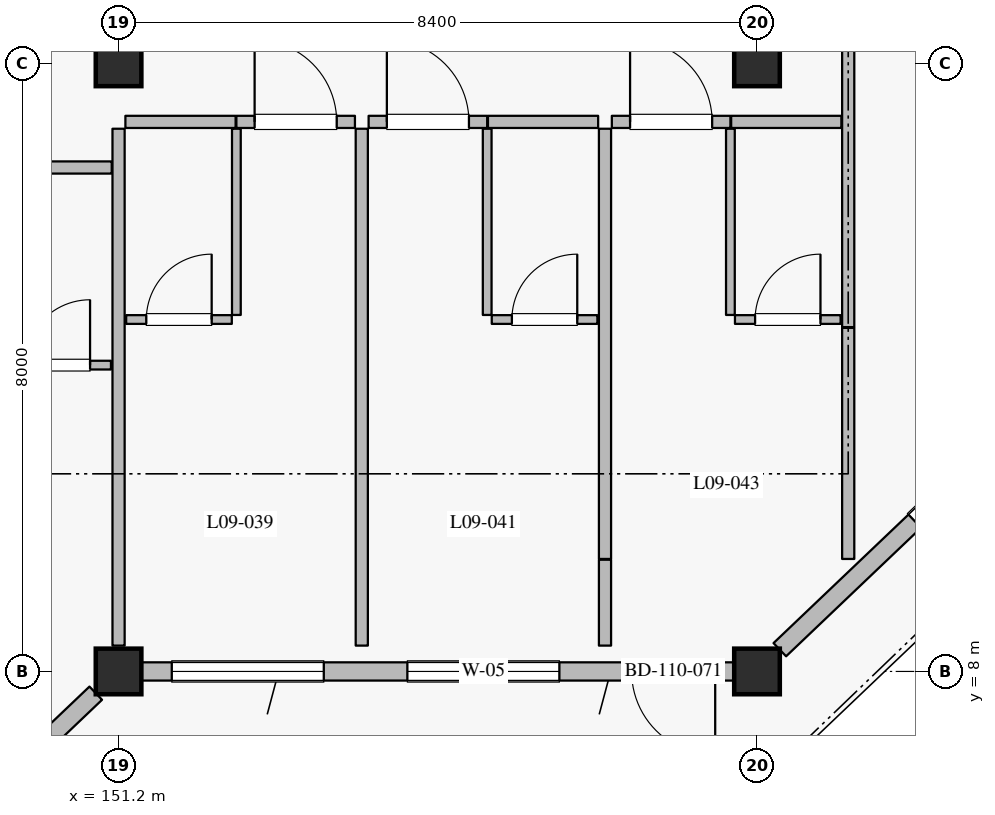
"""IFC4 building model, lengths in metres.
Left out: names, types, materials, properties, quantities, classifications, styles, units other than length and angle.
Written with IfcOpenShell. Run it as: python <this file> out.ifc"""

import sys

from ifc_helpers import new_model, si_unit, direction, frame, frame_2d, origin, origin_2d, place, context, subcontext, project, spatial, rectangle, extrude, element, fill, save


model = new_model("IFC4")
c1 = context("Model", 3, precision=1e-05, world=origin(), true_north=direction((0.0, 1.0)))
c2 = subcontext(c1, "Body", "Model", "MODEL_VIEW")
j1 = project(units=[si_unit("LENGTHUNIT", "METRE"), si_unit("PLANEANGLEUNIT", "RADIAN")], contexts=[c1])
p1 = place(None, origin())
s1 = spatial("IfcSite", under=j1, at=p1, CompositionType="ELEMENT")
p2 = place(p1, origin())
s2 = spatial("IfcBuilding", under=s1, at=p2, CompositionType="ELEMENT")
p3 = place(p2, frame((0.0, 0.0, 39.6)))
s3 = spatial("IfcBuildingStorey", under=s2, at=p3, CompositionType="ELEMENT", Elevation=39.6)
for number, where, z_axis, x_axis in (
    (1, (151.2, 8.0, 0.0), (0.0, 0.0, 1.0), (1.0, 0.0, 0.0)),
    (2, (159.6, 8.0, 0.0), (0.0, 0.0, 1.0), (1.0, 0.0, 0.0)),
    (3, (151.2, 16.0, 0.0), (0.0, 0.0, 1.0), (1.0, 0.0, 0.0)),
    (4, (159.6, 16.0, 0.0), (0.0, 0.0, 1.0), (1.0, 0.0, 0.0)),
):
    element("IfcColumn", number, at=place(p3, frame(where, z_axis=z_axis, x_axis=x_axis)), inside=s3, PredefinedType="COLUMN", context=c2, shape_type="SweptSolid", body=[
        extrude(rectangle(XDim=0.6, YDim=0.6, at=origin_2d()), origin(), (0.0, 0.0, 1.0), 3.6),
    ])
p4 = place(p3, frame((150.9, 7.714, 0.0), z_axis=(0.0, 0.0, 1.0), x_axis=(-0.724145477467, -0.689647248573, 0.0)))
e5 = element("IfcWall", 5, at=p4, inside=s3, PredefinedType="SOLIDWALL", context=c2, shape_type="SweptSolid", body=[
    extrude(rectangle(XDim=10.771, YDim=0.24, at=frame_2d((5.385, 0.0))), origin(), (0.0, 0.0, 1.0), 2.94),
])
p5 = place(p4, frame((1.238, 0.0, 0.0)))
e6 = element("IfcOpeningElement", 6, at=p5, cuts=e5, PredefinedType="OPENING", context=c2, shape_type="SweptSolid", body=[
    extrude(rectangle(XDim=1.5, YDim=2.25, at=frame_2d((0.75, 1.125))), frame((0.0, 0.13, 0.0), z_axis=(0.0, -1.0, 0.0), x_axis=(1.0, 0.0, 0.0)), (0.0, 0.0, 1.0), 0.26),
])
p6 = place(p4, frame((5.58, 0.0, 0.8)))
e7 = element("IfcOpeningElement", 7, at=p6, cuts=e5, PredefinedType="OPENING", context=c2, shape_type="SweptSolid", body=[
    extrude(rectangle(XDim=1.6, YDim=1.6, at=frame_2d((0.8, 0.8))), frame((0.0, 0.13, 0.0), z_axis=(0.0, -1.0, 0.0), x_axis=(1.0, 0.0, 0.0)), (0.0, 0.0, 1.0), 0.26),
])
p7 = place(p4, frame((8.977, 0.0, 0.8)))
e8 = element("IfcOpeningElement", 8, at=p7, cuts=e5, PredefinedType="OPENING", context=c2, shape_type="SweptSolid", body=[
    extrude(rectangle(XDim=1.6, YDim=1.6, at=frame_2d((0.8, 0.8))), frame((0.0, 0.13, 0.0), z_axis=(0.0, -1.0, 0.0), x_axis=(1.0, 0.0, 0.0)), (0.0, 0.0, 1.0), 0.26),
])
p8 = place(p3, frame((159.3, 8.0, 0.0), z_axis=(0.0, 0.0, 1.0), x_axis=(-1.0, 0.0, 0.0)))
e9 = element("IfcWall", 9, at=p8, inside=s3, PredefinedType="SOLIDWALL", context=c2, shape_type="SweptSolid", body=[
    extrude(rectangle(XDim=7.8, YDim=0.24, at=frame_2d((3.9, 0.0))), origin(), (0.0, 0.0, 1.0), 2.94),
])
p9 = place(p8, frame((0.25, 0.0, 0.0)))
e10 = element("IfcOpeningElement", 10, at=p9, cuts=e9, PredefinedType="OPENING", context=c2, shape_type="SweptSolid", body=[
    extrude(rectangle(XDim=1.1, YDim=2.2, at=frame_2d((0.55, 1.1))), frame((0.0, 0.13, 0.0), z_axis=(0.0, -1.0, 0.0), x_axis=(1.0, 0.0, 0.0)), (0.0, 0.0, 1.0), 0.26),
])
p10 = place(p8, frame((2.3, 0.0, 0.8)))
e11 = element("IfcOpeningElement", 11, at=p10, cuts=e9, PredefinedType="OPENING", context=c2, shape_type="SweptSolid", body=[
    extrude(rectangle(XDim=2.0, YDim=1.75, at=frame_2d((1.0, 0.875))), frame((0.0, 0.13, 0.0), z_axis=(0.0, -1.0, 0.0), x_axis=(1.0, 0.0, 0.0)), (0.0, 0.0, 1.0), 0.26),
])
p11 = place(p8, frame((5.4, 0.0, 0.8)))
e12 = element("IfcOpeningElement", 12, at=p11, cuts=e9, PredefinedType="OPENING", context=c2, shape_type="SweptSolid", body=[
    extrude(rectangle(XDim=2.0, YDim=1.75, at=frame_2d((1.0, 0.875))), frame((0.0, 0.13, 0.0), z_axis=(0.0, -1.0, 0.0), x_axis=(1.0, 0.0, 0.0)), (0.0, 0.0, 1.0), 0.26),
])
p12 = place(p3, frame((167.7, 15.714, 0.0), z_axis=(0.0, 0.0, 1.0), x_axis=(-0.724156257633, -0.689635928973, 0.0)))
e13 = element("IfcWall", 13, at=p12, inside=s3, PredefinedType="SOLIDWALL", context=c2, shape_type="SweptSolid", body=[
    extrude(rectangle(XDim=10.771, YDim=0.24, at=frame_2d((5.386, 0.0))), origin(), (0.0, 0.0, 1.0), 2.94),
])
p13 = place(p12, frame((2.15, 0.0, 0.0)))
e14 = element("IfcOpeningElement", 14, at=p13, cuts=e13, PredefinedType="OPENING", context=c2, shape_type="SweptSolid", body=[
    extrude(rectangle(XDim=1.5, YDim=2.25, at=frame_2d((0.75, 1.125))), frame((0.0, 0.13, 0.0), z_axis=(0.0, -1.0, 0.0), x_axis=(1.0, 0.0, 0.0)), (0.0, 0.0, 1.0), 0.26),
])
p14 = place(p12, frame((6.319, 0.0, 0.8)))
e15 = element("IfcOpeningElement", 15, at=p14, cuts=e13, PredefinedType="OPENING", context=c2, shape_type="SweptSolid", body=[
    extrude(rectangle(XDim=2.0, YDim=1.75, at=frame_2d((1.0, 0.875))), frame((0.0, 0.13, 0.0), z_axis=(0.0, -1.0, 0.0), x_axis=(1.0, 0.0, 0.0)), (0.0, 0.0, 1.0), 0.26),
])
p15 = place(p3, frame((149.64, 14.63, 0.0), z_axis=(0.0, 0.0, 1.0), x_axis=(1.0, 0.0, 0.0)))
e16 = element("IfcWall", 16, at=p15, inside=s3, PredefinedType="PARTITIONING", context=c2, shape_type="SweptSolid", body=[
    extrude(rectangle(XDim=1.47, YDim=0.16, at=frame_2d((0.735, 0.0))), origin(), (0.0, 0.0, 1.0), 3.335),
])
p16 = place(p3, frame((149.69, 12.03, 0.0), z_axis=(0.0, 0.0, 1.0), x_axis=(1.0, 0.0, 0.0)))
e17 = element("IfcWall", 17, at=p16, inside=s3, PredefinedType="PARTITIONING", context=c2, shape_type="SweptSolid", body=[
    extrude(rectangle(XDim=1.41, YDim=0.115, at=frame_2d((0.705, 0.0))), origin(), (0.0, 0.0, 1.0), 3.335),
])
p17 = place(p16, frame((0.275, 0.0, 0.0)))
e18 = element("IfcOpeningElement", 18, at=p17, cuts=e17, PredefinedType="OPENING", context=c2, shape_type="SweptSolid", body=[
    extrude(rectangle(XDim=0.86, YDim=2.12, at=frame_2d((0.43, 1.06))), frame((0.0, 0.067, 0.0), z_axis=(0.0, -1.0, 0.0), x_axis=(1.0, 0.0, 0.0)), (0.0, 0.0, 1.0), 0.135),
])
p18 = place(p3, frame((151.29, 15.23, 0.0), z_axis=(0.0, 0.0, 1.0), x_axis=(1.0, 0.0, 0.0)))
e19 = element("IfcWall", 19, at=p18, inside=s3, PredefinedType="PARTITIONING", context=c2, shape_type="SweptSolid", body=[
    extrude(rectangle(XDim=1.45, YDim=0.16, at=frame_2d((0.725, 0.0))), origin(), (0.0, 0.0, 1.0), 3.335),
])
p19 = place(p3, frame((152.75, 15.23, 0.0), z_axis=(0.0, 0.0, 1.0), x_axis=(1.0, 0.0, 0.0)))
e20 = element("IfcWall", 20, at=p19, inside=s3, PredefinedType="PARTITIONING", context=c2, shape_type="SweptSolid", body=[
    extrude(rectangle(XDim=1.56, YDim=0.16, at=frame_2d((0.78, 0.0))), origin(), (0.0, 0.0, 1.0), 3.335),
])
p20 = place(p19, frame((0.24, 0.0, 0.0)))
e21 = element("IfcOpeningElement", 21, at=p20, cuts=e20, PredefinedType="OPENING", context=c2, shape_type="SweptSolid", body=[
    extrude(rectangle(XDim=1.08, YDim=2.3, at=frame_2d((0.54, 1.15))), frame((0.0, 0.09, 0.0), z_axis=(0.0, -1.0, 0.0), x_axis=(1.0, 0.0, 0.0)), (0.0, 0.0, 1.0), 0.18),
])
p21 = place(p3, frame((152.75, 12.69, 0.0), z_axis=(0.0, 0.0, 1.0), x_axis=(0.0, 1.0, 0.0)))
e22 = element("IfcWall", 22, at=p21, inside=s3, PredefinedType="PARTITIONING", context=c2, shape_type="SweptSolid", body=[
    extrude(rectangle(XDim=2.45, YDim=0.115, at=frame_2d((1.225, 0.0))), origin(), (0.0, 0.0, 1.0), 3.335),
])
p22 = place(p3, frame((151.3, 12.63, 0.0), z_axis=(0.0, 0.0, 1.0), x_axis=(1.0, 0.0, 0.0)))
e23 = element("IfcWall", 23, at=p22, inside=s3, PredefinedType="PARTITIONING", context=c2, shape_type="SweptSolid", body=[
    extrude(rectangle(XDim=1.39, YDim=0.115, at=frame_2d((0.695, 0.0))), origin(), (0.0, 0.0, 1.0), 3.335),
])
p23 = place(p22, frame((0.265, 0.0, 0.0)))
e24 = element("IfcOpeningElement", 24, at=p23, cuts=e23, PredefinedType="OPENING", context=c2, shape_type="SweptSolid", body=[
    extrude(rectangle(XDim=0.86, YDim=2.12, at=frame_2d((0.43, 1.06))), frame((0.0, 0.067, 0.0), z_axis=(0.0, -1.0, 0.0), x_axis=(1.0, 0.0, 0.0)), (0.0, 0.0, 1.0), 0.135),
])
p24 = place(p3, frame((151.2, 8.34, 0.0), z_axis=(0.0, 0.0, 1.0), x_axis=(0.0, 1.0, 0.0)))
e25 = element("IfcWall", 25, at=p24, inside=s3, PredefinedType="PARTITIONING", context=c2, shape_type="SweptSolid", body=[
    extrude(rectangle(XDim=6.8, YDim=0.16, at=frame_2d((3.4, 0.0))), origin(), (0.0, 0.0, 1.0), 2.74),
])
p25 = place(p3, frame((154.49, 15.23, 0.0), z_axis=(0.0, 0.0, 1.0), x_axis=(1.0, 0.0, 0.0)))
e26 = element("IfcWall", 26, at=p25, inside=s3, PredefinedType="PARTITIONING", context=c2, shape_type="SweptSolid", body=[
    extrude(rectangle(XDim=1.56, YDim=0.16, at=frame_2d((0.78, 0.0))), origin(), (0.0, 0.0, 1.0), 3.335),
])
p26 = place(p25, frame((0.24, 0.0, 0.0)))
e27 = element("IfcOpeningElement", 27, at=p26, cuts=e26, PredefinedType="OPENING", context=c2, shape_type="SweptSolid", body=[
    extrude(rectangle(XDim=1.08, YDim=2.3, at=frame_2d((0.54, 1.15))), frame((0.0, 0.09, 0.0), z_axis=(0.0, -1.0, 0.0), x_axis=(1.0, 0.0, 0.0)), (0.0, 0.0, 1.0), 0.18),
])
p27 = place(p3, frame((156.06, 15.23, 0.0), z_axis=(0.0, 0.0, 1.0), x_axis=(1.0, 0.0, 0.0)))
e28 = element("IfcWall", 28, at=p27, inside=s3, PredefinedType="PARTITIONING", context=c2, shape_type="SweptSolid", body=[
    extrude(rectangle(XDim=1.45, YDim=0.16, at=frame_2d((0.725, 0.0))), origin(), (0.0, 0.0, 1.0), 3.335),
])
p28 = place(p3, frame((156.05, 12.69, 0.0), z_axis=(0.0, 0.0, 1.0), x_axis=(0.0, 1.0, 0.0)))
e29 = element("IfcWall", 29, at=p28, inside=s3, PredefinedType="PARTITIONING", context=c2, shape_type="SweptSolid", body=[
    extrude(rectangle(XDim=2.45, YDim=0.115, at=frame_2d((1.225, 0.0))), origin(), (0.0, 0.0, 1.0), 3.335),
])
p29 = place(p3, frame((156.11, 12.63, 0.0), z_axis=(0.0, 0.0, 1.0), x_axis=(1.0, 0.0, 0.0)))
e30 = element("IfcWall", 30, at=p29, inside=s3, PredefinedType="PARTITIONING", context=c2, shape_type="SweptSolid", body=[
    extrude(rectangle(XDim=1.39, YDim=0.115, at=frame_2d((0.695, 0.0))), origin(), (0.0, 0.0, 1.0), 3.335),
])
p30 = place(p29, frame((0.265, 0.0, 0.0)))
e31 = element("IfcOpeningElement", 31, at=p30, cuts=e30, PredefinedType="OPENING", context=c2, shape_type="SweptSolid", body=[
    extrude(rectangle(XDim=0.86, YDim=2.12, at=frame_2d((0.43, 1.06))), frame((0.0, 0.067, 0.0), z_axis=(0.0, -1.0, 0.0), x_axis=(1.0, 0.0, 0.0)), (0.0, 0.0, 1.0), 0.135),
])
p31 = place(p3, frame((154.4, 8.34, 0.0), z_axis=(0.0, 0.0, 1.0), x_axis=(0.0, 1.0, 0.0)))
e32 = element("IfcWall", 32, at=p31, inside=s3, PredefinedType="PARTITIONING", context=c2, shape_type="SweptSolid", body=[
    extrude(rectangle(XDim=6.8, YDim=0.16, at=frame_2d((3.4, 0.0))), origin(), (0.0, 0.0, 1.0), 3.335),
])
p32 = place(p3, frame((157.6, 8.34, 0.0), z_axis=(0.0, 0.0, 1.0), x_axis=(0.0, 1.0, 0.0)))
e33 = element("IfcWall", 33, at=p32, inside=s3, PredefinedType="PARTITIONING", context=c2, shape_type="SweptSolid", body=[
    extrude(rectangle(XDim=1.13, YDim=0.16, at=frame_2d((0.565, 0.0))), origin(), (0.0, 0.0, 1.0), 3.335),
])
p33 = place(p3, frame((157.69, 15.23, 0.0), z_axis=(0.0, 0.0, 1.0), x_axis=(1.0, 0.0, 0.0)))
e34 = element("IfcWall", 34, at=p33, inside=s3, PredefinedType="PARTITIONING", context=c2, shape_type="SweptSolid", body=[
    extrude(rectangle(XDim=1.56, YDim=0.16, at=frame_2d((0.78, 0.0))), origin(), (0.0, 0.0, 1.0), 3.335),
])
p34 = place(p33, frame((0.24, 0.0, 0.0)))
e35 = element("IfcOpeningElement", 35, at=p34, cuts=e34, PredefinedType="OPENING", context=c2, shape_type="SweptSolid", body=[
    extrude(rectangle(XDim=1.08, YDim=2.3, at=frame_2d((0.54, 1.15))), frame((0.0, 0.09, 0.0), z_axis=(0.0, -1.0, 0.0), x_axis=(1.0, 0.0, 0.0)), (0.0, 0.0, 1.0), 0.18),
])
p35 = place(p3, frame((159.26, 15.23, 0.0), z_axis=(0.0, 0.0, 1.0), x_axis=(1.0, 0.0, 0.0)))
e36 = element("IfcWall", 36, at=p35, inside=s3, PredefinedType="PARTITIONING", context=c2, shape_type="SweptSolid", body=[
    extrude(rectangle(XDim=1.45, YDim=0.16, at=frame_2d((0.725, 0.0))), origin(), (0.0, 0.0, 1.0), 3.335),
])
p36 = place(p3, frame((159.25, 12.69, 0.0), z_axis=(0.0, 0.0, 1.0), x_axis=(0.0, 1.0, 0.0)))
e37 = element("IfcWall", 37, at=p36, inside=s3, PredefinedType="PARTITIONING", context=c2, shape_type="SweptSolid", body=[
    extrude(rectangle(XDim=2.45, YDim=0.115, at=frame_2d((1.225, 0.0))), origin(), (0.0, 0.0, 1.0), 3.335),
])
p37 = place(p3, frame((159.31, 12.63, 0.0), z_axis=(0.0, 0.0, 1.0), x_axis=(1.0, 0.0, 0.0)))
e38 = element("IfcWall", 38, at=p37, inside=s3, PredefinedType="PARTITIONING", context=c2, shape_type="SweptSolid", body=[
    extrude(rectangle(XDim=1.39, YDim=0.115, at=frame_2d((0.695, 0.0))), origin(), (0.0, 0.0, 1.0), 3.335),
])
p38 = place(p37, frame((0.265, 0.0, 0.0)))
e39 = element("IfcOpeningElement", 39, at=p38, cuts=e38, PredefinedType="OPENING", context=c2, shape_type="SweptSolid", body=[
    extrude(rectangle(XDim=0.86, YDim=2.12, at=frame_2d((0.43, 1.06))), frame((0.0, 0.067, 0.0), z_axis=(0.0, -1.0, 0.0), x_axis=(1.0, 0.0, 0.0)), (0.0, 0.0, 1.0), 0.135),
])
p39 = place(p3, frame((157.6, 9.48, 0.0), z_axis=(0.0, 0.0, 1.0), x_axis=(0.0, 1.0, 0.0)))
e40 = element("IfcWall", 40, at=p39, inside=s3, PredefinedType="PARTITIONING", context=c2, shape_type="SweptSolid", body=[
    extrude(rectangle(XDim=5.66, YDim=0.16, at=frame_2d((2.83, 0.0))), origin(), (0.0, 0.0, 1.0), 3.335),
])
p40 = place(p3, frame((160.8, 9.48, 0.0), z_axis=(0.0, 0.0, 1.0), x_axis=(0.0, 1.0, 0.0)))
e41 = element("IfcWall", 41, at=p40, inside=s3, PredefinedType="PARTITIONING", context=c2, shape_type="SweptSolid", body=[
    extrude(rectangle(XDim=3.04, YDim=0.16, at=frame_2d((1.52, 0.0))), origin(), (0.0, 0.0, 1.0), 3.335),
])
p41 = place(p3, frame((160.8, 12.53, 0.0), z_axis=(0.0, 0.0, 1.0), x_axis=(0.0, 1.0, 0.0)))
e42 = element("IfcWall", 42, at=p41, inside=s3, PredefinedType="PARTITIONING", context=c2, shape_type="SweptSolid", body=[
    extrude(rectangle(XDim=9.55, YDim=0.16, at=frame_2d((4.775, 0.0))), origin(), (0.0, 0.0, 1.0), 3.335),
])
p42 = place(p9, origin())
e43 = element("IfcDoor", 43, at=p42, inside=s3, OperationType="SINGLE_SWING_LEFT", PredefinedType="DOOR", context=c2, shape_type="SweptSolid", body=[
    extrude(rectangle(XDim=1.1, YDim=2.2, at=frame_2d((0.55, 1.1))), frame((0.0, 0.025, 0.0), z_axis=(0.0, -1.0, 0.0), x_axis=(1.0, 0.0, 0.0)), (0.0, 0.0, 1.0), 0.05),
])
fill(e10, e43)
p43 = place(p10, origin())
e44 = element("IfcWindow", 44, at=p43, inside=s3, PartitioningType="DOUBLE_PANEL_VERTICAL", PredefinedType="WINDOW", context=c2, shape_type="SweptSolid", body=[
    extrude(rectangle(XDim=2.0, YDim=1.75, at=frame_2d((1.0, 0.875))), frame((0.0, 0.03, 0.0), z_axis=(0.0, -1.0, 0.0), x_axis=(1.0, 0.0, 0.0)), (0.0, 0.0, 1.0), 0.06),
])
fill(e11, e44)
p44 = place(p11, origin())
e45 = element("IfcWindow", 45, at=p44, inside=s3, PartitioningType="DOUBLE_PANEL_VERTICAL", PredefinedType="WINDOW", context=c2, shape_type="SweptSolid", body=[
    extrude(rectangle(XDim=2.0, YDim=1.75, at=frame_2d((1.0, 0.875))), frame((0.0, 0.03, 0.0), z_axis=(0.0, -1.0, 0.0), x_axis=(1.0, 0.0, 0.0)), (0.0, 0.0, 1.0), 0.06),
])
fill(e12, e45)
p45 = place(p14, origin())
e46 = element("IfcWindow", 46, at=p45, inside=s3, PartitioningType="DOUBLE_PANEL_VERTICAL", PredefinedType="WINDOW", context=c2, shape_type="SweptSolid", body=[
    extrude(rectangle(XDim=2.0, YDim=1.75, at=frame_2d((1.0, 0.875))), frame((0.0, 0.03, 0.0), z_axis=(0.0, -1.0, 0.0), x_axis=(1.0, 0.0, 0.0)), (0.0, 0.0, 1.0), 0.06),
])
fill(e15, e46)
p46 = place(p17, origin())
e47 = element("IfcDoor", 47, at=p46, inside=s3, OperationType="SINGLE_SWING_RIGHT", PredefinedType="DOOR", context=c2, shape_type="SweptSolid", body=[
    extrude(rectangle(XDim=0.86, YDim=2.12, at=frame_2d((0.43, 1.06))), frame((0.0, 0.025, 0.0), z_axis=(0.0, -1.0, 0.0), x_axis=(1.0, 0.0, 0.0)), (0.0, 0.0, 1.0), 0.05),
])
fill(e18, e47)
p47 = place(p20, origin())
e48 = element("IfcDoor", 48, at=p47, inside=s3, OperationType="SINGLE_SWING_LEFT", PredefinedType="DOOR", context=c2, shape_type="SweptSolid", body=[
    extrude(rectangle(XDim=1.08, YDim=2.3, at=frame_2d((0.54, 1.15))), frame((0.0, 0.025, 0.0), z_axis=(0.0, -1.0, 0.0), x_axis=(1.0, 0.0, 0.0)), (0.0, 0.0, 1.0), 0.05),
])
fill(e21, e48)
p48 = place(p23, origin())
e49 = element("IfcDoor", 49, at=p48, inside=s3, OperationType="SINGLE_SWING_RIGHT", PredefinedType="DOOR", context=c2, shape_type="SweptSolid", body=[
    extrude(rectangle(XDim=0.86, YDim=2.12, at=frame_2d((0.43, 1.06))), frame((0.0, 0.025, 0.0), z_axis=(0.0, -1.0, 0.0), x_axis=(1.0, 0.0, 0.0)), (0.0, 0.0, 1.0), 0.05),
])
fill(e24, e49)
p49 = place(p26, origin())
e50 = element("IfcDoor", 50, at=p49, inside=s3, OperationType="SINGLE_SWING_LEFT", PredefinedType="DOOR", context=c2, shape_type="SweptSolid", body=[
    extrude(rectangle(XDim=1.08, YDim=2.3, at=frame_2d((0.54, 1.15))), frame((0.0, 0.025, 0.0), z_axis=(0.0, -1.0, 0.0), x_axis=(1.0, 0.0, 0.0)), (0.0, 0.0, 1.0), 0.05),
])
fill(e27, e50)
p50 = place(p30, origin())
e51 = element("IfcDoor", 51, at=p50, inside=s3, OperationType="SINGLE_SWING_RIGHT", PredefinedType="DOOR", context=c2, shape_type="SweptSolid", body=[
    extrude(rectangle(XDim=0.86, YDim=2.12, at=frame_2d((0.43, 1.06))), frame((0.0, 0.025, 0.0), z_axis=(0.0, -1.0, 0.0), x_axis=(1.0, 0.0, 0.0)), (0.0, 0.0, 1.0), 0.05),
])
fill(e31, e51)
p51 = place(p34, origin())
e52 = element("IfcDoor", 52, at=p51, inside=s3, OperationType="SINGLE_SWING_LEFT", PredefinedType="DOOR", context=c2, shape_type="SweptSolid", body=[
    extrude(rectangle(XDim=1.08, YDim=2.3, at=frame_2d((0.54, 1.15))), frame((0.0, 0.025, 0.0), z_axis=(0.0, -1.0, 0.0), x_axis=(1.0, 0.0, 0.0)), (0.0, 0.0, 1.0), 0.05),
])
fill(e35, e52)
p52 = place(p38, origin())
e53 = element("IfcDoor", 53, at=p52, inside=s3, OperationType="SINGLE_SWING_RIGHT", PredefinedType="DOOR", context=c2, shape_type="SweptSolid", body=[
    extrude(rectangle(XDim=0.86, YDim=2.12, at=frame_2d((0.43, 1.06))), frame((0.0, 0.025, 0.0), z_axis=(0.0, -1.0, 0.0), x_axis=(1.0, 0.0, 0.0)), (0.0, 0.0, 1.0), 0.05),
])
fill(e39, e53)
save(model, sys.argv[1])
